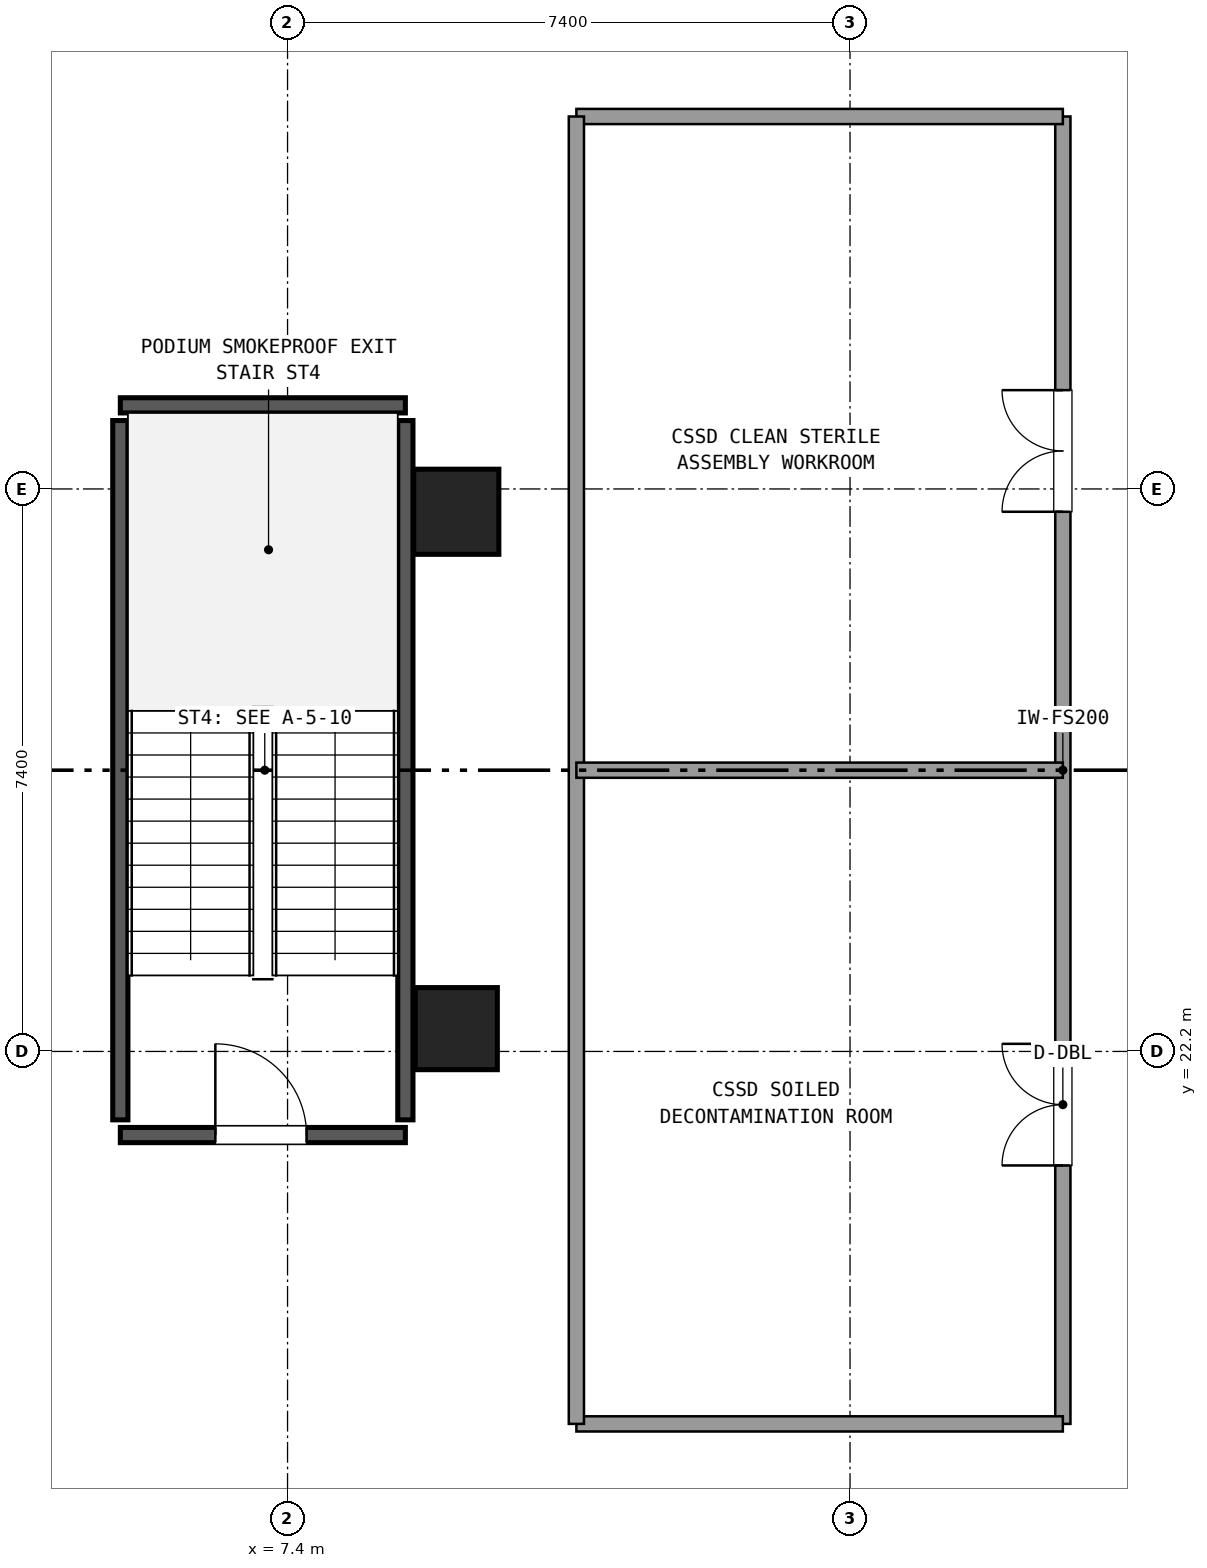
"""IFC4 building model, lengths in metres.
Left out: names, types, materials, properties, quantities, classifications, styles, units other than length and angle.
Written with IfcOpenShell. Run it as: python <this file> out.ifc"""

import sys

from ifc_helpers import new_model, si_unit, direction, frame, frame_2d, origin, origin_2d, place, context, subcontext, project, spatial, rectangle, circle, extrude, element, fill, save


model = new_model("IFC4")
c1 = context("Model", 3, precision=1e-05, world=origin(), true_north=direction((0.0, 1.0)))
c2 = subcontext(c1, "Body", "Model", "MODEL_VIEW")
j1 = project(units=[si_unit("LENGTHUNIT", "METRE"), si_unit("PLANEANGLEUNIT", "RADIAN")], contexts=[c1])
p1 = place(None, origin())
s1 = spatial("IfcSite", under=j1, at=p1, CompositionType="ELEMENT")
p2 = place(p1, origin())
s2 = spatial("IfcBuilding", under=s1, at=p2, CompositionType="ELEMENT")
p3 = place(p2, frame((0.0, 0.0, -9.72)))
s3 = spatial("IfcBuildingStorey", under=s2, at=p3, CompositionType="ELEMENT", Elevation=-9.72)
p4 = place(p3, frame((9.62, 22.5, 0.0), z_axis=(0.0, 0.0, 1.0), x_axis=(1.0, 0.0, 0.0)))
e1 = element("IfcColumn", 1, at=p4, inside=s3, PredefinedType="COLUMN", context=c2, shape_type="SweptSolid", body=[
    extrude(rectangle(XDim=1.08, YDim=1.08, at=origin_2d()), origin(), (0.0, 0.0, 1.0), 4.86),
])
p5 = place(p3, frame((9.62, 29.3, 0.0), z_axis=(0.0, 0.0, 1.0), x_axis=(1.0, 0.0, 0.0)))
e2 = element("IfcColumn", 2, at=p5, inside=s3, PredefinedType="COLUMN", context=c2, shape_type="SweptSolid", body=[
    extrude(circle(Radius=0.56, at=origin_2d()), origin(), (0.0, 0.0, 1.0), 4.86),
])
p6 = place(p3, frame((5.2, 21.1, 0.0), z_axis=(0.0, 0.0, 1.0), x_axis=(1.0, 0.0, 0.0)))
e3 = element("IfcWall", 3, at=p6, inside=s3, PredefinedType="SHEAR", context=c2, shape_type="SweptSolid", body=[
    extrude(rectangle(XDim=3.75, YDim=0.2, at=frame_2d((1.875, 0.0))), origin(), (0.0, 0.0, 1.0), 4.56),
])
p7 = place(p6, frame((1.25, 0.0, 0.0)))
e4 = element("IfcOpeningElement", 4, at=p7, cuts=e3, PredefinedType="OPENING", context=c2, shape_type="SweptSolid", body=[
    extrude(rectangle(XDim=1.2, YDim=2.15, at=frame_2d((0.6, 1.075))), frame((0.0, 0.11, 0.0), z_axis=(0.0, -1.0, 0.0), x_axis=(1.0, 0.0, 0.0)), (0.0, 0.0, 1.0), 0.22),
])
p8 = place(p3, frame((5.2, 30.7, 0.0), z_axis=(0.0, 0.0, 1.0), x_axis=(1.0, 0.0, 0.0)))
e5 = element("IfcWall", 5, at=p8, inside=s3, PredefinedType="SHEAR", context=c2, shape_type="SweptSolid", body=[
    extrude(rectangle(XDim=3.75, YDim=0.2, at=frame_2d((1.875, 0.0))), origin(), (0.0, 0.0, 1.0), 4.56),
])
for number, where, z_axis, x_axis in (
    (6, (5.2, 21.3, 0.0), (0.0, 0.0, 1.0), (0.0, 1.0, 0.0)),
    (7, (8.95, 21.3, 0.0), (0.0, 0.0, 1.0), (0.0, 1.0, 0.0)),
):
    element("IfcWall", number, at=place(p3, frame(where, z_axis=z_axis, x_axis=x_axis)), inside=s3, PredefinedType="SHEAR", context=c2, shape_type="SweptSolid", body=[
        extrude(rectangle(XDim=9.2, YDim=0.2, at=frame_2d((4.6, 0.0))), origin(), (0.0, 0.0, 1.0), 4.56),
    ])
p9 = place(p3, frame((17.6, 17.3, 0.0), z_axis=(0.0, 0.0, 1.0), x_axis=(0.0, 1.0, 0.0)))
e8 = element("IfcWall", 8, at=p9, inside=s3, PredefinedType="SOLIDWALL", context=c2, shape_type="SweptSolid", body=[
    extrude(rectangle(XDim=17.2, YDim=0.2, at=frame_2d((8.6, 0.0))), origin(), (0.0, 0.0, 1.0), 3.85),
])
p10 = place(p9, frame((3.4, 0.0, 0.0)))
e9 = element("IfcOpeningElement", 9, at=p10, cuts=e8, PredefinedType="OPENING", context=c2, shape_type="SweptSolid", body=[
    extrude(rectangle(XDim=1.6, YDim=2.2, at=frame_2d((0.8, 1.1))), frame((0.0, 0.11, 0.0), z_axis=(0.0, -1.0, 0.0), x_axis=(1.0, 0.0, 0.0)), (0.0, 0.0, 1.0), 0.22),
])
p11 = place(p9, frame((12.0, 0.0, 0.0)))
e10 = element("IfcOpeningElement", 10, at=p11, cuts=e8, PredefinedType="OPENING", context=c2, shape_type="SweptSolid", body=[
    extrude(rectangle(XDim=1.6, YDim=2.2, at=frame_2d((0.8, 1.1))), frame((0.0, 0.11, 0.0), z_axis=(0.0, -1.0, 0.0), x_axis=(1.0, 0.0, 0.0)), (0.0, 0.0, 1.0), 0.22),
])
for number, where, z_axis, x_axis in (
    (11, (11.2, 17.3, 0.0), (0.0, 0.0, 1.0), (1.0, 0.0, 0.0)),
    (12, (11.2, 34.5, 0.0), (0.0, 0.0, 1.0), (1.0, 0.0, 0.0)),
):
    element("IfcWall", number, at=place(p3, frame(where, z_axis=z_axis, x_axis=x_axis)), inside=s3, PredefinedType="SOLIDWALL", context=c2, shape_type="SweptSolid", body=[
        extrude(rectangle(XDim=6.4, YDim=0.2, at=frame_2d((3.2, 0.0))), origin(), (0.0, 0.0, 1.0), 3.85),
    ])
p12 = place(p3, frame((11.2, 17.3, 0.0), z_axis=(0.0, 0.0, 1.0), x_axis=(0.0, 1.0, 0.0)))
e13 = element("IfcWall", 13, at=p12, inside=s3, PredefinedType="SOLIDWALL", context=c2, shape_type="SweptSolid", body=[
    extrude(rectangle(XDim=17.2, YDim=0.2, at=frame_2d((8.6, 0.0))), origin(), (0.0, 0.0, 1.0), 3.85),
])
p13 = place(p3, frame((11.2, 25.9, 0.0), z_axis=(0.0, 0.0, 1.0), x_axis=(1.0, 0.0, 0.0)))
e14 = element("IfcWall", 14, at=p13, inside=s3, PredefinedType="SOLIDWALL", context=c2, shape_type="SweptSolid", body=[
    extrude(rectangle(XDim=6.4, YDim=0.2, at=frame_2d((3.2, 0.0))), origin(), (0.0, 0.0, 1.0), 3.85),
])
p14 = place(p7, origin())
e15 = element("IfcDoor", 15, at=p14, inside=s3, OperationType="SINGLE_SWING_LEFT", PredefinedType="DOOR", context=c2, shape_type="SweptSolid", body=[
    extrude(rectangle(XDim=1.2, YDim=2.15, at=frame_2d((0.6, 1.075))), frame((0.0, 0.025, 0.0), z_axis=(0.0, -1.0, 0.0), x_axis=(1.0, 0.0, 0.0)), (0.0, 0.0, 1.0), 0.05),
])
fill(e4, e15)
p15 = place(p10, origin())
e16 = element("IfcDoor", 16, at=p15, inside=s3, OperationType="DOUBLE_DOOR_SINGLE_SWING", PredefinedType="DOOR", context=c2, shape_type="SweptSolid", body=[
    extrude(rectangle(XDim=1.6, YDim=2.2, at=frame_2d((0.8, 1.1))), frame((0.0, 0.025, 0.0), z_axis=(0.0, -1.0, 0.0), x_axis=(1.0, 0.0, 0.0)), (0.0, 0.0, 1.0), 0.05),
])
fill(e9, e16)
p16 = place(p11, origin())
e17 = element("IfcDoor", 17, at=p16, inside=s3, OperationType="DOUBLE_DOOR_SINGLE_SWING", PredefinedType="DOOR", context=c2, shape_type="SweptSolid", body=[
    extrude(rectangle(XDim=1.6, YDim=2.2, at=frame_2d((0.8, 1.1))), frame((0.0, 0.025, 0.0), z_axis=(0.0, -1.0, 0.0), x_axis=(1.0, 0.0, 0.0)), (0.0, 0.0, 1.0), 0.05),
])
fill(e10, e17)
save(model, sys.argv[1])
